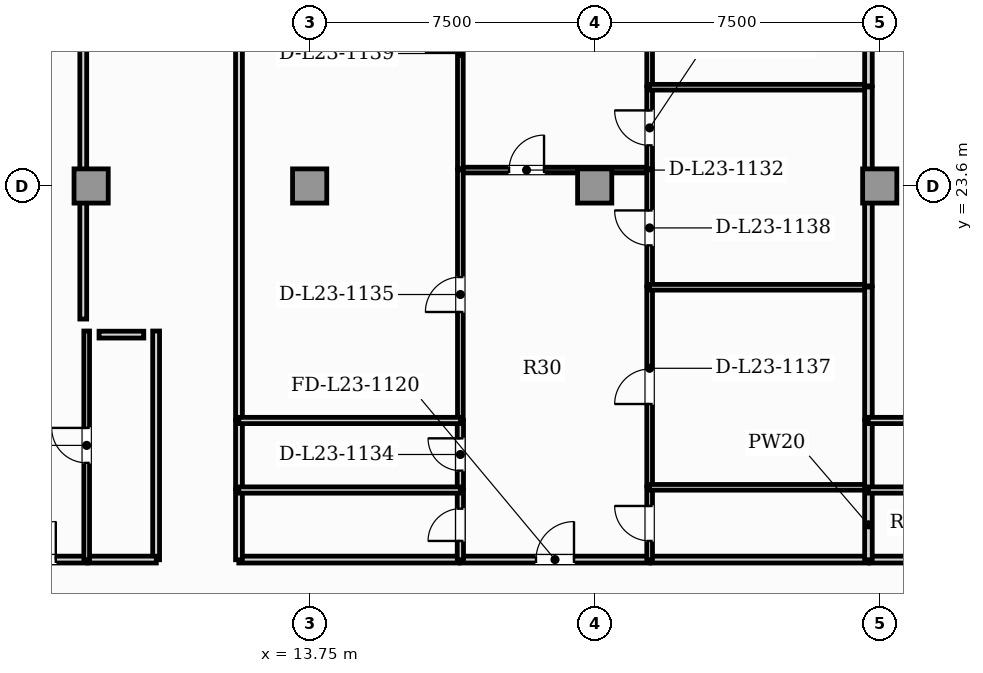
"""IFC4 building model, lengths in metres.
Left out: names, types, materials, properties, quantities, classifications, styles, units other than length and angle.
Written with IfcOpenShell. Run it as: python <this file> out.ifc"""

import sys

from ifc_helpers import new_model, si_unit, direction, frame, frame_2d, origin, origin_2d, place, context, subcontext, project, spatial, rectangle, extrude, element, fill, save


model = new_model("IFC4")
c1 = context("Model", 3, precision=1e-05, world=origin(), true_north=direction((0.0, 1.0)))
c2 = subcontext(c1, "Body", "Model", "MODEL_VIEW")
j1 = project(units=[si_unit("LENGTHUNIT", "METRE"), si_unit("PLANEANGLEUNIT", "RADIAN")], contexts=[c1])
p1 = place(None, origin())
s1 = spatial("IfcSite", under=j1, at=p1, CompositionType="ELEMENT")
p2 = place(p1, origin())
s2 = spatial("IfcBuilding", under=s1, at=p2, CompositionType="ELEMENT")
p3 = place(p2, frame((0.0, 0.0, 96.45)))
s3 = spatial("IfcBuildingStorey", under=s2, at=p3, CompositionType="ELEMENT", Elevation=96.45)
for number, where, z_axis, x_axis in (
    (1, (8.0, 23.6, 0.0), (0.0, 0.0, 1.0), (1.0, 0.0, 0.0)),
    (2, (13.75, 23.6, 0.0), (0.0, 0.0, 1.0), (1.0, 0.0, 0.0)),
    (3, (21.25, 23.6, 0.0), (0.0, 0.0, 1.0), (1.0, 0.0, 0.0)),
    (4, (28.75, 23.6, 0.0), (0.0, 0.0, 1.0), (1.0, 0.0, 0.0)),
):
    element("IfcColumn", number, at=place(p3, frame(where, z_axis=z_axis, x_axis=x_axis)), inside=s3, PredefinedType="COLUMN", context=c2, shape_type="SweptSolid", body=[
        extrude(rectangle(XDim=0.9, YDim=0.9, at=origin_2d()), origin(), (0.0, 0.0, 1.0), 3.85),
    ])
p4 = place(p3, frame((5.252, 13.77, 0.0), z_axis=(0.0, 0.0, 1.0), x_axis=(1.0, 0.0, 0.0)))
e5 = element("IfcWall", 5, at=p4, inside=s3, PredefinedType="PARTITIONING", context=c2, shape_type="SweptSolid", body=[
    extrude(rectangle(XDim=2.636, YDim=0.18, at=frame_2d((1.318, 0.0))), origin(), (0.0, 0.0, 1.0), 3.6),
])
p5 = place(p4, frame((0.818, 0.0, 0.0)))
e6 = element("IfcOpeningElement", 6, at=p5, cuts=e5, PredefinedType="OPENING", context=c2, shape_type="SweptSolid", body=[
    extrude(rectangle(XDim=1.0, YDim=2.15, at=frame_2d((0.5, 1.075))), frame((0.0, 0.1, 0.0), z_axis=(0.0, -1.0, 0.0), x_axis=(1.0, 0.0, 0.0)), (0.0, 0.0, 1.0), 0.2),
])
p6 = place(p3, frame((9.71, 13.765, 0.0), z_axis=(0.0, 0.0, 1.0), x_axis=(0.0, 1.0, 0.0)))
e7 = element("IfcWall", 7, at=p6, inside=s3, PredefinedType="PARTITIONING", context=c2, shape_type="SweptSolid", body=[
    extrude(rectangle(XDim=6.019, YDim=0.18, at=frame_2d((3.009, 0.0))), origin(), (0.0, 0.0, 1.0), 3.6),
])
p7 = place(p3, frame((7.918, 13.77, 0.0), z_axis=(0.0, 0.0, 1.0), x_axis=(1.0, 0.0, 0.0)))
e8 = element("IfcWall", 8, at=p7, inside=s3, PredefinedType="PARTITIONING", context=c2, shape_type="SweptSolid", body=[
    extrude(rectangle(XDim=1.797, YDim=0.18, at=frame_2d((0.898, 0.0))), origin(), (0.0, 0.0, 1.0), 3.6),
])
p8 = place(p3, frame((17.71, 13.77, 0.0), z_axis=(0.0, 0.0, 1.0), x_axis=(1.0, 0.0, 0.0)))
e9 = element("IfcWall", 9, at=p8, inside=s3, PredefinedType="PARTITIONING", context=c2, shape_type="SweptSolid", body=[
    extrude(rectangle(XDim=4.99, YDim=0.18, at=frame_2d((2.495, 0.0))), origin(), (0.0, 0.0, 1.0), 3.6),
])
p9 = place(p8, frame((1.995, 0.0, 0.0)))
e10 = element("IfcOpeningElement", 10, at=p9, cuts=e9, PredefinedType="OPENING", context=c2, shape_type="SweptSolid", body=[
    extrude(rectangle(XDim=1.0, YDim=2.15, at=frame_2d((0.5, 1.075))), frame((0.0, 0.1, 0.0), z_axis=(0.0, -1.0, 0.0), x_axis=(1.0, 0.0, 0.0)), (0.0, 0.0, 1.0), 0.2),
])
p10 = place(p3, frame((11.885, 13.77, 0.0), z_axis=(0.0, 0.0, 1.0), x_axis=(1.0, 0.0, 0.0)))
e11 = element("IfcWall", 11, at=p10, inside=s3, PredefinedType="PARTITIONING", context=c2, shape_type="SweptSolid", body=[
    extrude(rectangle(XDim=5.795, YDim=0.18, at=frame_2d((2.898, 0.0))), origin(), (0.0, 0.0, 1.0), 3.6),
])
p11 = place(p3, frame((11.89, 13.765, 0.0), z_axis=(0.0, 0.0, 1.0), x_axis=(0.0, 1.0, 0.0)))
e12 = element("IfcWall", 12, at=p11, inside=s3, PredefinedType="PARTITIONING", context=c2, shape_type="SweptSolid", body=[
    extrude(rectangle(XDim=1.84, YDim=0.18, at=frame_2d((0.92, 0.0))), origin(), (0.0, 0.0, 1.0), 3.6),
])
p12 = place(p3, frame((11.89, 15.635, 0.0), z_axis=(0.0, 0.0, 1.0), x_axis=(0.0, 1.0, 0.0)))
e13 = element("IfcWall", 13, at=p12, inside=s3, PredefinedType="PARTITIONING", context=c2, shape_type="SweptSolid", body=[
    extrude(rectangle(XDim=1.8, YDim=0.18, at=frame_2d((0.9, 0.0))), origin(), (0.0, 0.0, 1.0), 3.6),
])
p13 = place(p3, frame((11.89, 17.465, 0.0), z_axis=(0.0, 0.0, 1.0), x_axis=(0.0, 1.0, 0.0)))
e14 = element("IfcWall", 14, at=p13, inside=s3, PredefinedType="PARTITIONING", context=c2, shape_type="SweptSolid", body=[
    extrude(rectangle(XDim=10.43, YDim=0.18, at=frame_2d((5.215, 0.0))), origin(), (0.0, 0.0, 1.0), 3.6),
])
p14 = place(p3, frame((22.73, 13.77, 0.0), z_axis=(0.0, 0.0, 1.0), x_axis=(1.0, 0.0, 0.0)))
e15 = element("IfcWall", 15, at=p14, inside=s3, PredefinedType="PARTITIONING", context=c2, shape_type="SweptSolid", body=[
    extrude(rectangle(XDim=5.728, YDim=0.18, at=frame_2d((2.864, 0.0))), origin(), (0.0, 0.0, 1.0), 3.6),
])
p15 = place(p3, frame((28.488, 13.77, 0.0), z_axis=(0.0, 0.0, 1.0), x_axis=(1.0, 0.0, 0.0)))
e16 = element("IfcWall", 16, at=p15, inside=s3, PredefinedType="PARTITIONING", context=c2, shape_type="SweptSolid", body=[
    extrude(rectangle(XDim=5.983, YDim=0.18, at=frame_2d((2.992, 0.0))), origin(), (0.0, 0.0, 1.0), 3.6),
])
p16 = place(p3, frame((7.883, 13.765, 0.0), z_axis=(0.0, 0.0, 1.0), x_axis=(0.0, 1.0, 0.0)))
e17 = element("IfcWall", 17, at=p16, inside=s3, PredefinedType="PARTITIONING", context=c2, shape_type="SweptSolid", body=[
    extrude(rectangle(XDim=6.019, YDim=0.15, at=frame_2d((3.009, 0.0))), origin(), (0.0, 0.0, 1.0), 3.056),
])
p17 = place(p16, frame((2.549, 0.0, 0.0)))
e18 = element("IfcOpeningElement", 18, at=p17, cuts=e17, PredefinedType="OPENING", context=c2, shape_type="SweptSolid", body=[
    extrude(rectangle(XDim=0.92, YDim=2.1, at=frame_2d((0.46, 1.05))), frame((0.0, 0.085, 0.0), z_axis=(0.0, -1.0, 0.0), x_axis=(1.0, 0.0, 0.0)), (0.0, 0.0, 1.0), 0.17),
])
p18 = place(p3, frame((17.71, 24.019, 0.0), z_axis=(0.0, 0.0, 1.0), x_axis=(1.0, 0.0, 0.0)))
e19 = element("IfcWall", 19, at=p18, inside=s3, PredefinedType="PARTITIONING", context=c2, shape_type="SweptSolid", body=[
    extrude(rectangle(XDim=4.99, YDim=0.15, at=frame_2d((2.495, 0.0))), origin(), (0.0, 0.0, 1.0), 3.6),
])
p19 = place(p18, frame((1.287, 0.0, 0.0)))
e20 = element("IfcOpeningElement", 20, at=p19, cuts=e19, PredefinedType="OPENING", context=c2, shape_type="SweptSolid", body=[
    extrude(rectangle(XDim=0.92, YDim=2.1, at=frame_2d((0.46, 1.05))), frame((0.0, 0.085, 0.0), z_axis=(0.0, -1.0, 0.0), x_axis=(1.0, 0.0, 0.0)), (0.0, 0.0, 1.0), 0.17),
])
p20 = place(p3, frame((17.716, 13.765, 0.0), z_axis=(0.0, 0.0, 1.0), x_axis=(0.0, 1.0, 0.0)))
e21 = element("IfcWall", 21, at=p20, inside=s3, PredefinedType="PLUMBINGWALL", context=c2, shape_type="SweptSolid", body=[
    extrude(rectangle(XDim=1.84, YDim=0.165, at=frame_2d((0.92, 0.0))), origin(), (0.0, 0.0, 1.0), 3.6),
])
p21 = place(p20, frame((0.495, 0.0, 0.0)))
e22 = element("IfcOpeningElement", 22, at=p21, cuts=e21, PredefinedType="OPENING", context=c2, shape_type="SweptSolid", body=[
    extrude(rectangle(XDim=0.85, YDim=2.1, at=frame_2d((0.425, 1.05))), frame((0.0, 0.093, 0.0), z_axis=(0.0, -1.0, 0.0), x_axis=(1.0, 0.0, 0.0)), (0.0, 0.0, 1.0), 0.185),
])
p22 = place(p3, frame((17.716, 15.635, 0.0), z_axis=(0.0, 0.0, 1.0), x_axis=(0.0, 1.0, 0.0)))
e23 = element("IfcWall", 23, at=p22, inside=s3, PredefinedType="PLUMBINGWALL", context=c2, shape_type="SweptSolid", body=[
    extrude(rectangle(XDim=1.8, YDim=0.165, at=frame_2d((0.9, 0.0))), origin(), (0.0, 0.0, 1.0), 3.6),
])
p23 = place(p22, frame((0.475, 0.0, 0.0)))
e24 = element("IfcOpeningElement", 24, at=p23, cuts=e23, PredefinedType="OPENING", context=c2, shape_type="SweptSolid", body=[
    extrude(rectangle(XDim=0.85, YDim=2.1, at=frame_2d((0.425, 1.05))), frame((0.0, 0.093, 0.0), z_axis=(0.0, -1.0, 0.0), x_axis=(1.0, 0.0, 0.0)), (0.0, 0.0, 1.0), 0.185),
])
p24 = place(p3, frame((17.716, 17.465, 0.0), z_axis=(0.0, 0.0, 1.0), x_axis=(0.0, 1.0, 0.0)))
e25 = element("IfcWall", 25, at=p24, inside=s3, PredefinedType="PARTITIONING", context=c2, shape_type="SweptSolid", body=[
    extrude(rectangle(XDim=6.559, YDim=0.15, at=frame_2d((3.279, 0.0))), origin(), (0.0, 0.0, 1.0), 3.6),
])
p25 = place(p24, frame((2.819, 0.0, 0.0)))
e26 = element("IfcOpeningElement", 26, at=p25, cuts=e25, PredefinedType="OPENING", context=c2, shape_type="SweptSolid", body=[
    extrude(rectangle(XDim=0.92, YDim=2.1, at=frame_2d((0.46, 1.05))), frame((0.0, 0.085, 0.0), z_axis=(0.0, -1.0, 0.0), x_axis=(1.0, 0.0, 0.0)), (0.0, 0.0, 1.0), 0.17),
])
p26 = place(p3, frame((22.696, 13.765, 0.0), z_axis=(0.0, 0.0, 1.0), x_axis=(0.0, 1.0, 0.0)))
e27 = element("IfcWall", 27, at=p26, inside=s3, PredefinedType="PARTITIONING", context=c2, shape_type="SweptSolid", body=[
    extrude(rectangle(XDim=1.911, YDim=0.15, at=frame_2d((0.956, 0.0))), origin(), (0.0, 0.0, 1.0), 3.6),
])
p27 = place(p26, frame((0.496, 0.0, 0.0)))
e28 = element("IfcOpeningElement", 28, at=p27, cuts=e27, PredefinedType="OPENING", context=c2, shape_type="SweptSolid", body=[
    extrude(rectangle(XDim=0.92, YDim=2.1, at=frame_2d((0.46, 1.05))), frame((0.0, 0.085, 0.0), z_axis=(0.0, -1.0, 0.0), x_axis=(1.0, 0.0, 0.0)), (0.0, 0.0, 1.0), 0.17),
])
p28 = place(p3, frame((22.696, 15.706, 0.0), z_axis=(0.0, 0.0, 1.0), x_axis=(0.0, 1.0, 0.0)))
e29 = element("IfcWall", 29, at=p28, inside=s3, PredefinedType="PARTITIONING", context=c2, shape_type="SweptSolid", body=[
    extrude(rectangle(XDim=5.234, YDim=0.15, at=frame_2d((2.617, 0.0))), origin(), (0.0, 0.0, 1.0), 3.6),
])
p29 = place(p28, frame((2.157, 0.0, 0.0)))
e30 = element("IfcOpeningElement", 30, at=p29, cuts=e29, PredefinedType="OPENING", context=c2, shape_type="SweptSolid", body=[
    extrude(rectangle(XDim=0.92, YDim=2.1, at=frame_2d((0.46, 1.05))), frame((0.0, 0.085, 0.0), z_axis=(0.0, -1.0, 0.0), x_axis=(1.0, 0.0, 0.0)), (0.0, 0.0, 1.0), 0.17),
])
p30 = place(p3, frame((22.696, 20.97, 0.0), z_axis=(0.0, 0.0, 1.0), x_axis=(0.0, 1.0, 0.0)))
e31 = element("IfcWall", 31, at=p30, inside=s3, PredefinedType="PARTITIONING", context=c2, shape_type="SweptSolid", body=[
    extrude(rectangle(XDim=3.054, YDim=0.15, at=frame_2d((1.527, 0.0))), origin(), (0.0, 0.0, 1.0), 3.6),
])
p31 = place(p30, frame((1.067, 0.0, 0.0)))
e32 = element("IfcOpeningElement", 32, at=p31, cuts=e31, PredefinedType="OPENING", context=c2, shape_type="SweptSolid", body=[
    extrude(rectangle(XDim=0.92, YDim=2.1, at=frame_2d((0.46, 1.05))), frame((0.0, 0.085, 0.0), z_axis=(0.0, -1.0, 0.0), x_axis=(1.0, 0.0, 0.0)), (0.0, 0.0, 1.0), 0.17),
])
p32 = place(p3, frame((17.716, 24.054, 0.0), z_axis=(0.0, 0.0, 1.0), x_axis=(0.0, 1.0, 0.0)))
e33 = element("IfcWall", 33, at=p32, inside=s3, PredefinedType="PARTITIONING", context=c2, shape_type="SweptSolid", body=[
    extrude(rectangle(XDim=7.023, YDim=0.15, at=frame_2d((3.512, 0.0))), origin(), (0.0, 0.0, 1.0), 3.6),
])
p33 = place(p32, frame((3.052, 0.0, 0.0)))
e34 = element("IfcOpeningElement", 34, at=p33, cuts=e33, PredefinedType="OPENING", context=c2, shape_type="SweptSolid", body=[
    extrude(rectangle(XDim=0.92, YDim=2.1, at=frame_2d((0.46, 1.05))), frame((0.0, 0.085, 0.0), z_axis=(0.0, -1.0, 0.0), x_axis=(1.0, 0.0, 0.0)), (0.0, 0.0, 1.0), 0.17),
])
p34 = place(p3, frame((22.696, 24.054, 0.0), z_axis=(0.0, 0.0, 1.0), x_axis=(0.0, 1.0, 0.0)))
e35 = element("IfcWall", 35, at=p34, inside=s3, PredefinedType="PARTITIONING", context=c2, shape_type="SweptSolid", body=[
    extrude(rectangle(XDim=2.15, YDim=0.15, at=frame_2d((1.075, 0.0))), origin(), (0.0, 0.0, 1.0), 3.6),
])
p35 = place(p34, frame((0.615, 0.0, 0.0)))
e36 = element("IfcOpeningElement", 36, at=p35, cuts=e35, PredefinedType="OPENING", context=c2, shape_type="SweptSolid", body=[
    extrude(rectangle(XDim=0.92, YDim=2.1, at=frame_2d((0.46, 1.05))), frame((0.0, 0.085, 0.0), z_axis=(0.0, -1.0, 0.0), x_axis=(1.0, 0.0, 0.0)), (0.0, 0.0, 1.0), 0.17),
])
p36 = place(p3, frame((22.696, 26.234, 0.0), z_axis=(0.0, 0.0, 1.0), x_axis=(0.0, 1.0, 0.0)))
e37 = element("IfcWall", 37, at=p36, inside=s3, PredefinedType="PARTITIONING", context=c2, shape_type="SweptSolid", body=[
    extrude(rectangle(XDim=7.271, YDim=0.15, at=frame_2d((3.636, 0.0))), origin(), (0.0, 0.0, 1.0), 3.6),
])
p37 = place(p36, frame((3.176, 0.0, 0.0)))
e38 = element("IfcOpeningElement", 38, at=p37, cuts=e37, PredefinedType="OPENING", context=c2, shape_type="SweptSolid", body=[
    extrude(rectangle(XDim=0.92, YDim=2.1, at=frame_2d((0.46, 1.05))), frame((0.0, 0.085, 0.0), z_axis=(0.0, -1.0, 0.0), x_axis=(1.0, 0.0, 0.0)), (0.0, 0.0, 1.0), 0.17),
])
for number, where, z_axis, x_axis in (
    (39, (11.885, 15.6, 0.0), (0.0, 0.0, 1.0), (1.0, 0.0, 0.0)),
    (40, (11.885, 17.43, 0.0), (0.0, 0.0, 1.0), (1.0, 0.0, 0.0)),
):
    element("IfcWall", number, at=place(p3, frame(where, z_axis=z_axis, x_axis=x_axis)), inside=s3, PredefinedType="PLUMBINGWALL", context=c2, shape_type="SweptSolid", body=[
        extrude(rectangle(XDim=5.835, YDim=0.165, at=frame_2d((2.918, 0.0))), origin(), (0.0, 0.0, 1.0), 3.6),
    ])
p38 = place(p3, frame((22.69, 15.671, 0.0), z_axis=(0.0, 0.0, 1.0), x_axis=(1.0, 0.0, 0.0)))
e41 = element("IfcWall", 41, at=p38, inside=s3, PredefinedType="PARTITIONING", context=c2, shape_type="SweptSolid", body=[
    extrude(rectangle(XDim=5.768, YDim=0.15, at=frame_2d((2.884, 0.0))), origin(), (0.0, 0.0, 1.0), 3.6),
])
p39 = place(p3, frame((28.453, 13.765, 0.0), z_axis=(0.0, 0.0, 1.0), x_axis=(0.0, 1.0, 0.0)))
e42 = element("IfcWall", 42, at=p39, inside=s3, PredefinedType="PARTITIONING", context=c2, shape_type="SweptSolid", body=[
    extrude(rectangle(XDim=1.84, YDim=0.2, at=frame_2d((0.92, 0.0))), origin(), (0.0, 0.0, 1.0), 3.6),
])
p40 = place(p3, frame((22.69, 20.935, 0.0), z_axis=(0.0, 0.0, 1.0), x_axis=(1.0, 0.0, 0.0)))
e43 = element("IfcWall", 43, at=p40, inside=s3, PredefinedType="PARTITIONING", context=c2, shape_type="SweptSolid", body=[
    extrude(rectangle(XDim=5.768, YDim=0.15, at=frame_2d((2.884, 0.0))), origin(), (0.0, 0.0, 1.0), 3.6),
])
p41 = place(p3, frame((28.453, 15.666, 0.0), z_axis=(0.0, 0.0, 1.0), x_axis=(0.0, 1.0, 0.0)))
e44 = element("IfcWall", 44, at=p41, inside=s3, PredefinedType="PARTITIONING", context=c2, shape_type="SweptSolid", body=[
    extrude(rectangle(XDim=1.769, YDim=0.2, at=frame_2d((0.884, 0.0))), origin(), (0.0, 0.0, 1.0), 3.6),
])
p42 = place(p3, frame((28.453, 17.465, 0.0), z_axis=(0.0, 0.0, 1.0), x_axis=(0.0, 1.0, 0.0)))
e45 = element("IfcWall", 45, at=p42, inside=s3, PredefinedType="PARTITIONING", context=c2, shape_type="SweptSolid", body=[
    extrude(rectangle(XDim=3.475, YDim=0.2, at=frame_2d((1.737, 0.0))), origin(), (0.0, 0.0, 1.0), 3.6),
])
p43 = place(p3, frame((22.69, 26.198, 0.0), z_axis=(0.0, 0.0, 1.0), x_axis=(1.0, 0.0, 0.0)))
e46 = element("IfcWall", 46, at=p43, inside=s3, PredefinedType="PARTITIONING", context=c2, shape_type="SweptSolid", body=[
    extrude(rectangle(XDim=5.768, YDim=0.15, at=frame_2d((2.884, 0.0))), origin(), (0.0, 0.0, 1.0), 3.6),
])
p44 = place(p3, frame((28.453, 20.97, 0.0), z_axis=(0.0, 0.0, 1.0), x_axis=(0.0, 1.0, 0.0)))
e47 = element("IfcWall", 47, at=p44, inside=s3, PredefinedType="PARTITIONING", context=c2, shape_type="SweptSolid", body=[
    extrude(rectangle(XDim=5.234, YDim=0.2, at=frame_2d((2.617, 0.0))), origin(), (0.0, 0.0, 1.0), 3.6),
])
p45 = place(p3, frame((28.453, 26.234, 0.0), z_axis=(0.0, 0.0, 1.0), x_axis=(0.0, 1.0, 0.0)))
e48 = element("IfcWall", 48, at=p45, inside=s3, PredefinedType="PARTITIONING", context=c2, shape_type="SweptSolid", body=[
    extrude(rectangle(XDim=4.322, YDim=0.2, at=frame_2d((2.161, 0.0))), origin(), (0.0, 0.0, 1.0), 3.6),
])
for number, where, z_axis, x_axis in (
    (49, (28.448, 15.6, 0.0), (0.0, 0.0, 1.0), (1.0, 0.0, 0.0)),
    (50, (28.448, 17.43, 0.0), (0.0, 0.0, 1.0), (1.0, 0.0, 0.0)),
):
    element("IfcWall", number, at=place(p3, frame(where, z_axis=z_axis, x_axis=x_axis)), inside=s3, PredefinedType="PLUMBINGWALL", context=c2, shape_type="SweptSolid", body=[
        extrude(rectangle(XDim=6.063, YDim=0.165, at=frame_2d((3.031, 0.0))), origin(), (0.0, 0.0, 1.0), 3.6),
    ])
p46 = place(p3, frame((7.793, 33.685, 0.0), z_axis=(0.0, 0.0, 1.0), x_axis=(0.0, -1.0, 0.0)))
e51 = element("IfcWall", 51, at=p46, inside=s3, PredefinedType="PARTITIONING", context=c2, shape_type="SweptSolid", body=[
    extrude(rectangle(XDim=13.586, YDim=0.18, at=frame_2d((6.793, 0.0))), origin(), (0.0, 0.0, 1.0), 3.056),
])
p47 = place(p3, frame((8.208, 19.689, 0.0), z_axis=(0.0, 0.0, 1.0), x_axis=(1.0, 0.0, 0.0)))
e52 = element("IfcWall", 52, at=p47, inside=s3, PredefinedType="PARTITIONING", context=c2, shape_type="SweptSolid", body=[
    extrude(rectangle(XDim=1.177, YDim=0.18, at=frame_2d((0.588, 0.0))), origin(), (0.0, 0.0, 1.0), 3.6),
])
p48 = place(p5, origin())
e53 = element("IfcDoor", 53, at=p48, inside=s3, OperationType="SINGLE_SWING_RIGHT", PredefinedType="DOOR", context=c2, shape_type="SweptSolid", body=[
    extrude(rectangle(XDim=1.0, YDim=2.15, at=frame_2d((0.5, 1.075))), frame((0.0, 0.025, 0.0), z_axis=(0.0, -1.0, 0.0), x_axis=(1.0, 0.0, 0.0)), (0.0, 0.0, 1.0), 0.05),
])
fill(e6, e53)
p49 = place(p9, origin())
e54 = element("IfcDoor", 54, at=p49, inside=s3, OperationType="SINGLE_SWING_RIGHT", PredefinedType="DOOR", context=c2, shape_type="SweptSolid", body=[
    extrude(rectangle(XDim=1.0, YDim=2.15, at=frame_2d((0.5, 1.075))), frame((0.0, 0.025, 0.0), z_axis=(0.0, -1.0, 0.0), x_axis=(1.0, 0.0, 0.0)), (0.0, 0.0, 1.0), 0.05),
])
fill(e10, e54)
p50 = place(p17, origin())
e55 = element("IfcDoor", 55, at=p50, inside=s3, OperationType="SINGLE_SWING_RIGHT", PredefinedType="DOOR", context=c2, shape_type="SweptSolid", body=[
    extrude(rectangle(XDim=0.92, YDim=2.1, at=frame_2d((0.46, 1.05))), frame((0.0, 0.025, 0.0), z_axis=(0.0, -1.0, 0.0), x_axis=(1.0, 0.0, 0.0)), (0.0, 0.0, 1.0), 0.05),
])
fill(e18, e55)
p51 = place(p19, origin())
e56 = element("IfcDoor", 56, at=p51, inside=s3, OperationType="SINGLE_SWING_RIGHT", PredefinedType="DOOR", context=c2, shape_type="SweptSolid", body=[
    extrude(rectangle(XDim=0.92, YDim=2.1, at=frame_2d((0.46, 1.05))), frame((0.0, 0.025, 0.0), z_axis=(0.0, -1.0, 0.0), x_axis=(1.0, 0.0, 0.0)), (0.0, 0.0, 1.0), 0.05),
])
fill(e20, e56)
p52 = place(p21, origin())
e57 = element("IfcDoor", 57, at=p52, inside=s3, OperationType="SINGLE_SWING_LEFT", PredefinedType="DOOR", context=c2, shape_type="SweptSolid", body=[
    extrude(rectangle(XDim=0.85, YDim=2.1, at=frame_2d((0.425, 1.05))), frame((0.0, 0.025, 0.0), z_axis=(0.0, -1.0, 0.0), x_axis=(1.0, 0.0, 0.0)), (0.0, 0.0, 1.0), 0.05),
])
fill(e22, e57)
p53 = place(p23, origin())
e58 = element("IfcDoor", 58, at=p53, inside=s3, OperationType="SINGLE_SWING_RIGHT", PredefinedType="DOOR", context=c2, shape_type="SweptSolid", body=[
    extrude(rectangle(XDim=0.85, YDim=2.1, at=frame_2d((0.425, 1.05))), frame((0.0, 0.025, 0.0), z_axis=(0.0, -1.0, 0.0), x_axis=(1.0, 0.0, 0.0)), (0.0, 0.0, 1.0), 0.05),
])
fill(e24, e58)
p54 = place(p25, origin())
e59 = element("IfcDoor", 59, at=p54, inside=s3, OperationType="SINGLE_SWING_LEFT", PredefinedType="DOOR", context=c2, shape_type="SweptSolid", body=[
    extrude(rectangle(XDim=0.92, YDim=2.1, at=frame_2d((0.46, 1.05))), frame((0.0, 0.025, 0.0), z_axis=(0.0, -1.0, 0.0), x_axis=(1.0, 0.0, 0.0)), (0.0, 0.0, 1.0), 0.05),
])
fill(e26, e59)
p55 = place(p27, origin())
e60 = element("IfcDoor", 60, at=p55, inside=s3, OperationType="SINGLE_SWING_RIGHT", PredefinedType="DOOR", context=c2, shape_type="SweptSolid", body=[
    extrude(rectangle(XDim=0.92, YDim=2.1, at=frame_2d((0.46, 1.05))), frame((0.0, 0.025, 0.0), z_axis=(0.0, -1.0, 0.0), x_axis=(1.0, 0.0, 0.0)), (0.0, 0.0, 1.0), 0.05),
])
fill(e28, e60)
p56 = place(p29, origin())
e61 = element("IfcDoor", 61, at=p56, inside=s3, OperationType="SINGLE_SWING_LEFT", PredefinedType="DOOR", context=c2, shape_type="SweptSolid", body=[
    extrude(rectangle(XDim=0.92, YDim=2.1, at=frame_2d((0.46, 1.05))), frame((0.0, 0.025, 0.0), z_axis=(0.0, -1.0, 0.0), x_axis=(1.0, 0.0, 0.0)), (0.0, 0.0, 1.0), 0.05),
])
fill(e30, e61)
p57 = place(p31, origin())
e62 = element("IfcDoor", 62, at=p57, inside=s3, OperationType="SINGLE_SWING_RIGHT", PredefinedType="DOOR", context=c2, shape_type="SweptSolid", body=[
    extrude(rectangle(XDim=0.92, YDim=2.1, at=frame_2d((0.46, 1.05))), frame((0.0, 0.025, 0.0), z_axis=(0.0, -1.0, 0.0), x_axis=(1.0, 0.0, 0.0)), (0.0, 0.0, 1.0), 0.05),
])
fill(e32, e62)
p58 = place(p33, origin())
e63 = element("IfcDoor", 63, at=p58, inside=s3, OperationType="SINGLE_SWING_LEFT", PredefinedType="DOOR", context=c2, shape_type="SweptSolid", body=[
    extrude(rectangle(XDim=0.92, YDim=2.1, at=frame_2d((0.46, 1.05))), frame((0.0, 0.025, 0.0), z_axis=(0.0, -1.0, 0.0), x_axis=(1.0, 0.0, 0.0)), (0.0, 0.0, 1.0), 0.05),
])
fill(e34, e63)
p59 = place(p35, origin())
e64 = element("IfcDoor", 64, at=p59, inside=s3, OperationType="SINGLE_SWING_RIGHT", PredefinedType="DOOR", context=c2, shape_type="SweptSolid", body=[
    extrude(rectangle(XDim=0.92, YDim=2.1, at=frame_2d((0.46, 1.05))), frame((0.0, 0.025, 0.0), z_axis=(0.0, -1.0, 0.0), x_axis=(1.0, 0.0, 0.0)), (0.0, 0.0, 1.0), 0.05),
])
fill(e36, e64)
save(model, sys.argv[1])
